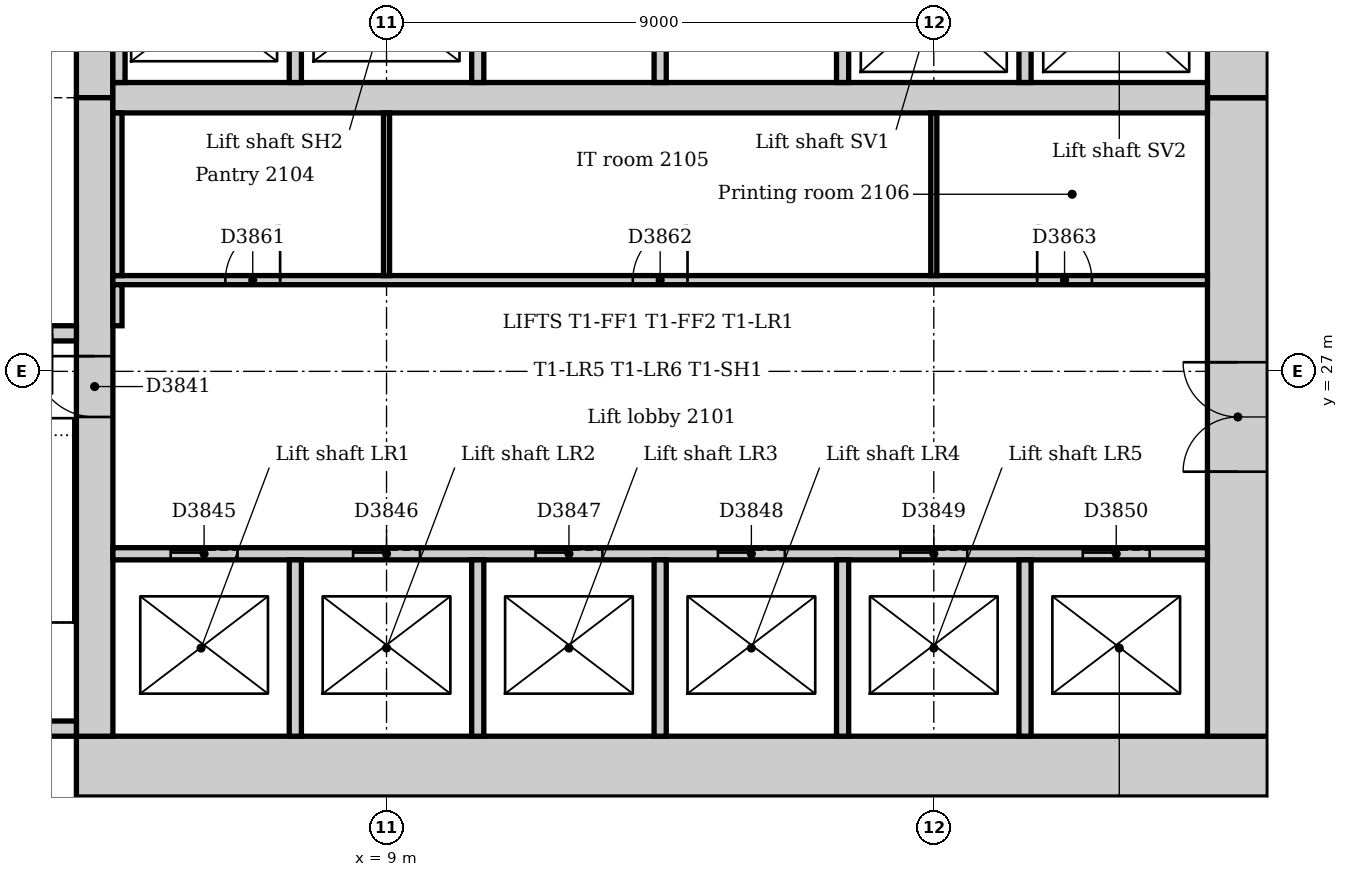
"""IFC4 building model, lengths in metres.
Left out: names, types, materials, properties, quantities, classifications, styles, units other than length and angle.
Written with IfcOpenShell. Run it as: python <this file> out.ifc"""

import sys

from ifc_helpers import new_model, si_unit, direction, frame, frame_2d, origin, place, context, subcontext, project, spatial, rectangle, extrude, element, fill, save


model = new_model("IFC4")
c1 = context("Model", 3, precision=1e-05, world=origin(), true_north=direction((0.0, 1.0)))
c2 = subcontext(c1, "Body", "Model", "MODEL_VIEW")
j1 = project(units=[si_unit("LENGTHUNIT", "METRE"), si_unit("PLANEANGLEUNIT", "RADIAN")], contexts=[c1])
p1 = place(None, origin())
s1 = spatial("IfcSite", under=j1, at=p1, CompositionType="ELEMENT")
p2 = place(p1, origin())
s2 = spatial("IfcBuilding", under=s1, at=p2, CompositionType="ELEMENT")
p3 = place(p2, frame((0.0, 0.0, 91.0)))
s3 = spatial("IfcBuildingStorey", under=s2, at=p3, CompositionType="ELEMENT", Elevation=91.0)
p4 = place(p3, frame((3.9, 20.5, 0.0), z_axis=(0.0, 0.0, 1.0), x_axis=(1.0, 0.0, 0.0)))
e1 = element("IfcWall", 1, at=p4, inside=s3, PredefinedType="SOLIDWALL", context=c2, shape_type="SweptSolid", body=[
    extrude(rectangle(XDim=19.6, YDim=1.0, at=frame_2d((9.8, 0.0))), origin(), (0.0, 0.0, 1.0), 4.0),
])
p5 = place(p3, frame((23.0, 21.0, 0.0), z_axis=(0.0, 0.0, 1.0), x_axis=(0.0, 1.0, 0.0)))
e2 = element("IfcWall", 2, at=p5, inside=s3, PredefinedType="SOLIDWALL", context=c2, shape_type="SweptSolid", body=[
    extrude(rectangle(XDim=10.5, YDim=1.0, at=frame_2d((5.25, 0.0))), origin(), (0.0, 0.0, 1.0), 4.0),
])
p6 = place(p5, frame((4.35, 0.0, 0.0)))
e3 = element("IfcOpeningElement", 3, at=p6, cuts=e2, PredefinedType="OPENING", context=c2, shape_type="SweptSolid", body=[
    extrude(rectangle(XDim=1.8, YDim=2.1, at=frame_2d((0.9, 1.05))), frame((0.0, 0.51, 0.0), z_axis=(0.0, -1.0, 0.0), x_axis=(1.0, 0.0, 0.0)), (0.0, 0.0, 1.0), 1.02),
])
p7 = place(p3, frame((23.0, 31.5, 0.0), z_axis=(0.0, 0.0, 1.0), x_axis=(0.0, 1.0, 0.0)))
e4 = element("IfcWall", 4, at=p7, inside=s3, PredefinedType="SOLIDWALL", context=c2, shape_type="SweptSolid", body=[
    extrude(rectangle(XDim=10.5, YDim=1.0, at=frame_2d((5.25, 0.0))), origin(), (0.0, 0.0, 1.0), 4.0),
])
p8 = place(p7, frame((3.15, 0.0, 0.0)))
e5 = element("IfcOpeningElement", 5, at=p8, cuts=e4, PredefinedType="OPENING", context=c2, shape_type="SweptSolid", body=[
    extrude(rectangle(XDim=1.0, YDim=2.1, at=frame_2d((0.5, 1.05))), frame((0.0, 0.51, 0.0), z_axis=(0.0, -1.0, 0.0), x_axis=(1.0, 0.0, 0.0)), (0.0, 0.0, 1.0), 1.02),
])
p9 = place(p7, frame((5.2, 0.0, 0.0)))
e6 = element("IfcOpeningElement", 6, at=p9, cuts=e4, PredefinedType="OPENING", context=c2, shape_type="SweptSolid", body=[
    extrude(rectangle(XDim=1.0, YDim=2.1, at=frame_2d((0.5, 1.05))), frame((0.0, 0.51, 0.0), z_axis=(0.0, -1.0, 0.0), x_axis=(1.0, 0.0, 0.0)), (0.0, 0.0, 1.0), 1.02),
])
p10 = place(p3, frame((4.2, 42.0, 0.0), z_axis=(0.0, 0.0, 1.0), x_axis=(0.0, -1.0, 0.0)))
e7 = element("IfcWall", 7, at=p10, inside=s3, PredefinedType="SOLIDWALL", context=c2, shape_type="SweptSolid", body=[
    extrude(rectangle(XDim=10.5, YDim=0.6, at=frame_2d((5.25, 0.0))), origin(), (0.0, 0.0, 1.0), 4.0),
])
p11 = place(p10, frame((5.3, 0.0, 0.0)))
e8 = element("IfcOpeningElement", 8, at=p11, cuts=e7, PredefinedType="OPENING", context=c2, shape_type="SweptSolid", body=[
    extrude(rectangle(XDim=1.0, YDim=2.1, at=frame_2d((0.5, 1.05))), frame((0.0, 0.31, 0.0), z_axis=(0.0, -1.0, 0.0), x_axis=(1.0, 0.0, 0.0)), (0.0, 0.0, 1.0), 0.62),
])
p12 = place(p3, frame((4.2, 31.5, 0.0), z_axis=(0.0, 0.0, 1.0), x_axis=(0.0, -1.0, 0.0)))
e9 = element("IfcWall", 9, at=p12, inside=s3, PredefinedType="SOLIDWALL", context=c2, shape_type="SweptSolid", body=[
    extrude(rectangle(XDim=10.5, YDim=0.6, at=frame_2d((5.25, 0.0))), origin(), (0.0, 0.0, 1.0), 4.0),
])
p13 = place(p12, frame((4.25, 0.0, 0.0)))
e10 = element("IfcOpeningElement", 10, at=p13, cuts=e9, PredefinedType="OPENING", context=c2, shape_type="SweptSolid", body=[
    extrude(rectangle(XDim=1.0, YDim=2.1, at=frame_2d((0.5, 1.05))), frame((0.0, 0.31, 0.0), z_axis=(0.0, -1.0, 0.0), x_axis=(1.0, 0.0, 0.0)), (0.0, 0.0, 1.0), 0.62),
])
p14 = place(p3, frame((4.5, 31.5, 0.0), z_axis=(0.0, 0.0, 1.0), x_axis=(1.0, 0.0, 0.0)))
e11 = element("IfcWall", 11, at=p14, inside=s3, PredefinedType="SOLIDWALL", context=c2, shape_type="SweptSolid", body=[
    extrude(rectangle(XDim=18.0, YDim=0.5, at=frame_2d((9.0, 0.0))), origin(), (0.0, 0.0, 1.0), 4.0),
])
p15 = place(p3, frame((0.36, 21.125, 0.0), z_axis=(0.0, 0.0, 1.0), x_axis=(1.0, 0.0, 0.0)))
e12 = element("IfcWall", 12, at=p15, inside=s3, PredefinedType="SOLIDWALL", context=c2, shape_type="SweptSolid", body=[
    extrude(rectangle(XDim=3.54, YDim=0.25, at=frame_2d((1.77, 0.0))), origin(), (0.0, 0.0, 1.0), 4.0),
])
p16 = place(p3, frame((3.9, 27.625, 0.0), z_axis=(0.0, 0.0, 1.0), x_axis=(-1.0, 0.0, 0.0)))
e13 = element("IfcWall", 13, at=p16, inside=s3, PredefinedType="SOLIDWALL", context=c2, shape_type="SweptSolid", body=[
    extrude(rectangle(XDim=3.54, YDim=0.25, at=frame_2d((1.77, 0.0))), origin(), (0.0, 0.0, 1.0), 4.0),
])
p17 = place(p16, frame((0.4, 0.0, 0.0)))
e14 = element("IfcOpeningElement", 14, at=p17, cuts=e13, PredefinedType="OPENING", context=c2, shape_type="SweptSolid", body=[
    extrude(rectangle(XDim=1.0, YDim=2.1, at=frame_2d((0.5, 1.05))), frame((0.0, 0.135, 0.0), z_axis=(0.0, -1.0, 0.0), x_axis=(1.0, 0.0, 0.0)), (0.0, 0.0, 1.0), 0.27),
])
p18 = place(p3, frame((4.5, 24.0, 0.0), z_axis=(0.0, 0.0, 1.0), x_axis=(1.0, 0.0, 0.0)))
e15 = element("IfcWall", 15, at=p18, inside=s3, PredefinedType="PARTITIONING", context=c2, shape_type="SweptSolid", body=[
    extrude(rectangle(XDim=18.0, YDim=0.2, at=frame_2d((9.0, 0.0))), origin(), (0.0, 0.0, 1.0), 3.7),
])
p19 = place(p18, frame((0.95, 0.0, 0.0)))
e16 = element("IfcOpeningElement", 16, at=p19, cuts=e15, PredefinedType="OPENING", context=c2, shape_type="SweptSolid", body=[
    extrude(rectangle(XDim=1.1, YDim=2.1, at=frame_2d((0.55, 1.05))), frame((0.0, 0.11, 0.0), z_axis=(0.0, -1.0, 0.0), x_axis=(1.0, 0.0, 0.0)), (0.0, 0.0, 1.0), 0.22),
])
p20 = place(p18, frame((3.95, 0.0, 0.0)))
e17 = element("IfcOpeningElement", 17, at=p20, cuts=e15, PredefinedType="OPENING", context=c2, shape_type="SweptSolid", body=[
    extrude(rectangle(XDim=1.1, YDim=2.1, at=frame_2d((0.55, 1.05))), frame((0.0, 0.11, 0.0), z_axis=(0.0, -1.0, 0.0), x_axis=(1.0, 0.0, 0.0)), (0.0, 0.0, 1.0), 0.22),
])
p21 = place(p18, frame((6.95, 0.0, 0.0)))
e18 = element("IfcOpeningElement", 18, at=p21, cuts=e15, PredefinedType="OPENING", context=c2, shape_type="SweptSolid", body=[
    extrude(rectangle(XDim=1.1, YDim=2.1, at=frame_2d((0.55, 1.05))), frame((0.0, 0.11, 0.0), z_axis=(0.0, -1.0, 0.0), x_axis=(1.0, 0.0, 0.0)), (0.0, 0.0, 1.0), 0.22),
])
p22 = place(p18, frame((9.95, 0.0, 0.0)))
e19 = element("IfcOpeningElement", 19, at=p22, cuts=e15, PredefinedType="OPENING", context=c2, shape_type="SweptSolid", body=[
    extrude(rectangle(XDim=1.1, YDim=2.1, at=frame_2d((0.55, 1.05))), frame((0.0, 0.11, 0.0), z_axis=(0.0, -1.0, 0.0), x_axis=(1.0, 0.0, 0.0)), (0.0, 0.0, 1.0), 0.22),
])
p23 = place(p18, frame((12.95, 0.0, 0.0)))
e20 = element("IfcOpeningElement", 20, at=p23, cuts=e15, PredefinedType="OPENING", context=c2, shape_type="SweptSolid", body=[
    extrude(rectangle(XDim=1.1, YDim=2.1, at=frame_2d((0.55, 1.05))), frame((0.0, 0.11, 0.0), z_axis=(0.0, -1.0, 0.0), x_axis=(1.0, 0.0, 0.0)), (0.0, 0.0, 1.0), 0.22),
])
p24 = place(p18, frame((15.95, 0.0, 0.0)))
e21 = element("IfcOpeningElement", 21, at=p24, cuts=e15, PredefinedType="OPENING", context=c2, shape_type="SweptSolid", body=[
    extrude(rectangle(XDim=1.1, YDim=2.1, at=frame_2d((0.55, 1.05))), frame((0.0, 0.11, 0.0), z_axis=(0.0, -1.0, 0.0), x_axis=(1.0, 0.0, 0.0)), (0.0, 0.0, 1.0), 0.22),
])
p25 = place(p3, frame((4.6, 31.75, 0.0), z_axis=(0.0, 0.0, 1.0), x_axis=(0.0, 1.0, 0.0)))
e22 = element("IfcWall", 22, at=p25, inside=s3, PredefinedType="PARTITIONING", context=c2, shape_type="SweptSolid", body=[
    extrude(rectangle(XDim=2.65, YDim=0.2, at=frame_2d((1.325, 0.0))), origin(), (0.0, 0.0, 1.0), 3.7),
])
p26 = place(p3, frame((7.5, 21.0, 0.0), z_axis=(0.0, 0.0, 1.0), x_axis=(0.0, 1.0, 0.0)))
e23 = element("IfcWall", 23, at=p26, inside=s3, PredefinedType="PARTITIONING", context=c2, shape_type="SweptSolid", body=[
    extrude(rectangle(XDim=2.9, YDim=0.2, at=frame_2d((1.45, 0.0))), origin(), (0.0, 0.0, 1.0), 3.7),
])
p27 = place(p3, frame((7.5, 31.75, 0.0), z_axis=(0.0, 0.0, 1.0), x_axis=(0.0, 1.0, 0.0)))
e24 = element("IfcWall", 24, at=p27, inside=s3, PredefinedType="PARTITIONING", context=c2, shape_type="SweptSolid", body=[
    extrude(rectangle(XDim=2.65, YDim=0.2, at=frame_2d((1.325, 0.0))), origin(), (0.0, 0.0, 1.0), 3.7),
])
p28 = place(p3, frame((10.5, 21.0, 0.0), z_axis=(0.0, 0.0, 1.0), x_axis=(0.0, 1.0, 0.0)))
e25 = element("IfcWall", 25, at=p28, inside=s3, PredefinedType="PARTITIONING", context=c2, shape_type="SweptSolid", body=[
    extrude(rectangle(XDim=2.9, YDim=0.2, at=frame_2d((1.45, 0.0))), origin(), (0.0, 0.0, 1.0), 3.7),
])
p29 = place(p3, frame((10.5, 31.75, 0.0), z_axis=(0.0, 0.0, 1.0), x_axis=(0.0, 1.0, 0.0)))
e26 = element("IfcWall", 26, at=p29, inside=s3, PredefinedType="PARTITIONING", context=c2, shape_type="SweptSolid", body=[
    extrude(rectangle(XDim=2.65, YDim=0.2, at=frame_2d((1.325, 0.0))), origin(), (0.0, 0.0, 1.0), 3.7),
])
p30 = place(p3, frame((13.5, 21.0, 0.0), z_axis=(0.0, 0.0, 1.0), x_axis=(0.0, 1.0, 0.0)))
e27 = element("IfcWall", 27, at=p30, inside=s3, PredefinedType="PARTITIONING", context=c2, shape_type="SweptSolid", body=[
    extrude(rectangle(XDim=2.9, YDim=0.2, at=frame_2d((1.45, 0.0))), origin(), (0.0, 0.0, 1.0), 3.7),
])
p31 = place(p3, frame((13.5, 31.75, 0.0), z_axis=(0.0, 0.0, 1.0), x_axis=(0.0, 1.0, 0.0)))
e28 = element("IfcWall", 28, at=p31, inside=s3, PredefinedType="PARTITIONING", context=c2, shape_type="SweptSolid", body=[
    extrude(rectangle(XDim=2.65, YDim=0.2, at=frame_2d((1.325, 0.0))), origin(), (0.0, 0.0, 1.0), 3.7),
])
p32 = place(p3, frame((16.5, 21.0, 0.0), z_axis=(0.0, 0.0, 1.0), x_axis=(0.0, 1.0, 0.0)))
e29 = element("IfcWall", 29, at=p32, inside=s3, PredefinedType="PARTITIONING", context=c2, shape_type="SweptSolid", body=[
    extrude(rectangle(XDim=2.9, YDim=0.2, at=frame_2d((1.45, 0.0))), origin(), (0.0, 0.0, 1.0), 3.7),
])
p33 = place(p3, frame((16.5, 31.75, 0.0), z_axis=(0.0, 0.0, 1.0), x_axis=(0.0, 1.0, 0.0)))
e30 = element("IfcWall", 30, at=p33, inside=s3, PredefinedType="PARTITIONING", context=c2, shape_type="SweptSolid", body=[
    extrude(rectangle(XDim=2.65, YDim=0.2, at=frame_2d((1.325, 0.0))), origin(), (0.0, 0.0, 1.0), 3.7),
])
p34 = place(p3, frame((19.5, 21.0, 0.0), z_axis=(0.0, 0.0, 1.0), x_axis=(0.0, 1.0, 0.0)))
e31 = element("IfcWall", 31, at=p34, inside=s3, PredefinedType="PARTITIONING", context=c2, shape_type="SweptSolid", body=[
    extrude(rectangle(XDim=2.9, YDim=0.2, at=frame_2d((1.45, 0.0))), origin(), (0.0, 0.0, 1.0), 3.7),
])
p35 = place(p3, frame((19.5, 31.75, 0.0), z_axis=(0.0, 0.0, 1.0), x_axis=(0.0, 1.0, 0.0)))
e32 = element("IfcWall", 32, at=p35, inside=s3, PredefinedType="PARTITIONING", context=c2, shape_type="SweptSolid", body=[
    extrude(rectangle(XDim=2.65, YDim=0.2, at=frame_2d((1.325, 0.0))), origin(), (0.0, 0.0, 1.0), 3.7),
])
p36 = place(p3, frame((4.5, 28.5, 0.0), z_axis=(0.0, 0.0, 1.0), x_axis=(1.0, 0.0, 0.0)))
e33 = element("IfcWall", 33, at=p36, inside=s3, PredefinedType="PARTITIONING", context=c2, shape_type="SweptSolid", body=[
    extrude(rectangle(XDim=18.0, YDim=0.15, at=frame_2d((9.0, 0.0))), origin(), (0.0, 0.0, 1.0), 3.7),
])
p37 = place(p36, frame((1.85, 0.0, 0.0)))
e34 = element("IfcOpeningElement", 34, at=p37, cuts=e33, PredefinedType="OPENING", context=c2, shape_type="SweptSolid", body=[
    extrude(rectangle(XDim=0.9, YDim=2.1, at=frame_2d((0.45, 1.05))), frame((0.0, 0.085, 0.0), z_axis=(0.0, -1.0, 0.0), x_axis=(1.0, 0.0, 0.0)), (0.0, 0.0, 1.0), 0.17),
])
p38 = place(p36, frame((8.55, 0.0, 0.0)))
e35 = element("IfcOpeningElement", 35, at=p38, cuts=e33, PredefinedType="OPENING", context=c2, shape_type="SweptSolid", body=[
    extrude(rectangle(XDim=0.9, YDim=2.1, at=frame_2d((0.45, 1.05))), frame((0.0, 0.085, 0.0), z_axis=(0.0, -1.0, 0.0), x_axis=(1.0, 0.0, 0.0)), (0.0, 0.0, 1.0), 0.17),
])
p39 = place(p36, frame((15.2, 0.0, 0.0)))
e36 = element("IfcOpeningElement", 36, at=p39, cuts=e33, PredefinedType="OPENING", context=c2, shape_type="SweptSolid", body=[
    extrude(rectangle(XDim=0.9, YDim=2.1, at=frame_2d((0.45, 1.05))), frame((0.0, 0.085, 0.0), z_axis=(0.0, -1.0, 0.0), x_axis=(1.0, 0.0, 0.0)), (0.0, 0.0, 1.0), 0.17),
])
p40 = place(p3, frame((4.575, 27.75, 0.0), z_axis=(0.0, 0.0, 1.0), x_axis=(0.0, 1.0, 0.0)))
e37 = element("IfcWall", 37, at=p40, inside=s3, PredefinedType="PARTITIONING", context=c2, shape_type="SweptSolid", body=[
    extrude(rectangle(XDim=0.675, YDim=0.15, at=frame_2d((0.338, 0.0))), origin(), (0.0, 0.0, 1.0), 3.7),
])
p41 = place(p3, frame((4.575, 28.575, 0.0), z_axis=(0.0, 0.0, 1.0), x_axis=(0.0, 1.0, 0.0)))
e38 = element("IfcWall", 38, at=p41, inside=s3, PredefinedType="PARTITIONING", context=c2, shape_type="SweptSolid", body=[
    extrude(rectangle(XDim=2.675, YDim=0.15, at=frame_2d((1.337, 0.0))), origin(), (0.0, 0.0, 1.0), 3.7),
])
for number, where, z_axis, x_axis in (
    (39, (9.0, 28.575, 0.0), (0.0, 0.0, 1.0), (0.0, 1.0, 0.0)),
    (40, (18.0, 28.575, 0.0), (0.0, 0.0, 1.0), (0.0, 1.0, 0.0)),
):
    element("IfcWall", number, at=place(p3, frame(where, z_axis=z_axis, x_axis=x_axis)), inside=s3, PredefinedType="PARTITIONING", context=c2, shape_type="SweptSolid", body=[
        extrude(rectangle(XDim=2.675, YDim=0.1, at=frame_2d((1.337, 0.0))), origin(), (0.0, 0.0, 1.0), 3.7),
    ])
p42 = place(p13, frame((1.0, 0.0, 0.0), z_axis=(0.0, 0.0, 1.0), x_axis=(-1.0, 0.0, 0.0)))
e41 = element("IfcDoor", 41, at=p42, inside=s3, OperationType="SINGLE_SWING_RIGHT", PredefinedType="DOOR", context=c2, shape_type="SweptSolid", body=[
    extrude(rectangle(XDim=1.0, YDim=2.1, at=frame_2d((0.5, 1.05))), frame((0.0, 0.025, 0.0), z_axis=(0.0, -1.0, 0.0), x_axis=(1.0, 0.0, 0.0)), (0.0, 0.0, 1.0), 0.05),
])
fill(e10, e41)
p43 = place(p19, origin())
e42 = element("IfcDoor", 42, at=p43, inside=s3, OperationType="SLIDING_TO_LEFT", PredefinedType="DOOR", context=c2, shape_type="SweptSolid", body=[
    extrude(rectangle(XDim=1.1, YDim=2.1, at=frame_2d((0.55, 1.05))), frame((0.0, 0.025, 0.0), z_axis=(0.0, -1.0, 0.0), x_axis=(1.0, 0.0, 0.0)), (0.0, 0.0, 1.0), 0.05),
])
fill(e16, e42)
p44 = place(p20, origin())
e43 = element("IfcDoor", 43, at=p44, inside=s3, OperationType="SLIDING_TO_LEFT", PredefinedType="DOOR", context=c2, shape_type="SweptSolid", body=[
    extrude(rectangle(XDim=1.1, YDim=2.1, at=frame_2d((0.55, 1.05))), frame((0.0, 0.025, 0.0), z_axis=(0.0, -1.0, 0.0), x_axis=(1.0, 0.0, 0.0)), (0.0, 0.0, 1.0), 0.05),
])
fill(e17, e43)
p45 = place(p21, origin())
e44 = element("IfcDoor", 44, at=p45, inside=s3, OperationType="SLIDING_TO_LEFT", PredefinedType="DOOR", context=c2, shape_type="SweptSolid", body=[
    extrude(rectangle(XDim=1.1, YDim=2.1, at=frame_2d((0.55, 1.05))), frame((0.0, 0.025, 0.0), z_axis=(0.0, -1.0, 0.0), x_axis=(1.0, 0.0, 0.0)), (0.0, 0.0, 1.0), 0.05),
])
fill(e18, e44)
p46 = place(p22, origin())
e45 = element("IfcDoor", 45, at=p46, inside=s3, OperationType="SLIDING_TO_LEFT", PredefinedType="DOOR", context=c2, shape_type="SweptSolid", body=[
    extrude(rectangle(XDim=1.1, YDim=2.1, at=frame_2d((0.55, 1.05))), frame((0.0, 0.025, 0.0), z_axis=(0.0, -1.0, 0.0), x_axis=(1.0, 0.0, 0.0)), (0.0, 0.0, 1.0), 0.05),
])
fill(e19, e45)
p47 = place(p23, origin())
e46 = element("IfcDoor", 46, at=p47, inside=s3, OperationType="SLIDING_TO_LEFT", PredefinedType="DOOR", context=c2, shape_type="SweptSolid", body=[
    extrude(rectangle(XDim=1.1, YDim=2.1, at=frame_2d((0.55, 1.05))), frame((0.0, 0.025, 0.0), z_axis=(0.0, -1.0, 0.0), x_axis=(1.0, 0.0, 0.0)), (0.0, 0.0, 1.0), 0.05),
])
fill(e20, e46)
p48 = place(p24, origin())
e47 = element("IfcDoor", 47, at=p48, inside=s3, OperationType="SLIDING_TO_LEFT", PredefinedType="DOOR", context=c2, shape_type="SweptSolid", body=[
    extrude(rectangle(XDim=1.1, YDim=2.1, at=frame_2d((0.55, 1.05))), frame((0.0, 0.025, 0.0), z_axis=(0.0, -1.0, 0.0), x_axis=(1.0, 0.0, 0.0)), (0.0, 0.0, 1.0), 0.05),
])
fill(e21, e47)
p49 = place(p6, origin())
e48 = element("IfcDoor", 48, at=p49, inside=s3, OperationType="DOUBLE_DOOR_DOUBLE_SWING", PredefinedType="DOOR", context=c2, shape_type="SweptSolid", body=[
    extrude(rectangle(XDim=1.8, YDim=2.1, at=frame_2d((0.9, 1.05))), frame((0.0, 0.025, 0.0), z_axis=(0.0, -1.0, 0.0), x_axis=(1.0, 0.0, 0.0)), (0.0, 0.0, 1.0), 0.05),
])
fill(e3, e48)
p50 = place(p37, origin())
e49 = element("IfcDoor", 49, at=p50, inside=s3, OperationType="SINGLE_SWING_RIGHT", PredefinedType="DOOR", context=c2, shape_type="SweptSolid", body=[
    extrude(rectangle(XDim=0.9, YDim=2.1, at=frame_2d((0.45, 1.05))), frame((0.0, 0.025, 0.0), z_axis=(0.0, -1.0, 0.0), x_axis=(1.0, 0.0, 0.0)), (0.0, 0.0, 1.0), 0.05),
])
fill(e34, e49)
p51 = place(p38, origin())
e50 = element("IfcDoor", 50, at=p51, inside=s3, OperationType="SINGLE_SWING_RIGHT", PredefinedType="DOOR", context=c2, shape_type="SweptSolid", body=[
    extrude(rectangle(XDim=0.9, YDim=2.1, at=frame_2d((0.45, 1.05))), frame((0.0, 0.025, 0.0), z_axis=(0.0, -1.0, 0.0), x_axis=(1.0, 0.0, 0.0)), (0.0, 0.0, 1.0), 0.05),
])
fill(e35, e50)
p52 = place(p39, origin())
e51 = element("IfcDoor", 51, at=p52, inside=s3, OperationType="SINGLE_SWING_LEFT", PredefinedType="DOOR", context=c2, shape_type="SweptSolid", body=[
    extrude(rectangle(XDim=0.9, YDim=2.1, at=frame_2d((0.45, 1.05))), frame((0.0, 0.025, 0.0), z_axis=(0.0, -1.0, 0.0), x_axis=(1.0, 0.0, 0.0)), (0.0, 0.0, 1.0), 0.05),
])
fill(e36, e51)
save(model, sys.argv[1])
